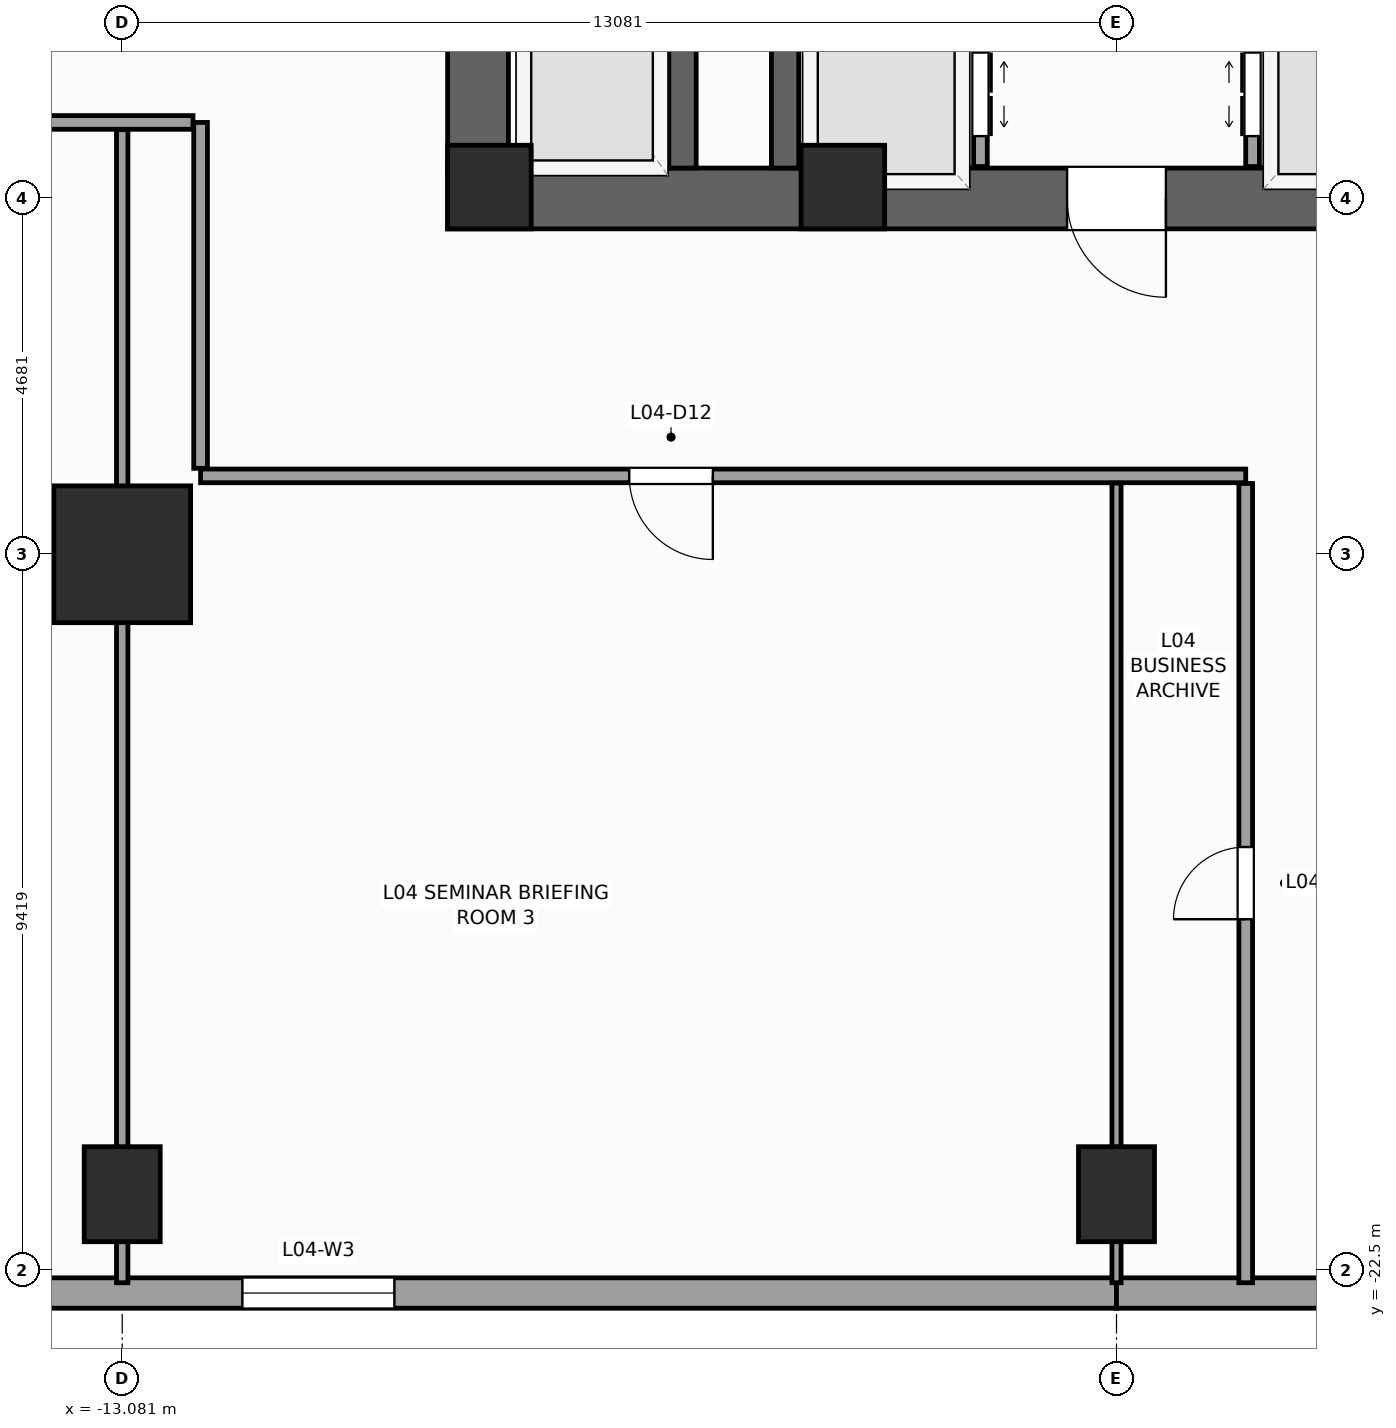
"""IFC4 building model, lengths in metres.
Left out: names, types, materials, properties, quantities, classifications, styles, units other than length and angle.
Written with IfcOpenShell. Run it as: python <this file> out.ifc"""

import sys

from ifc_helpers import new_model, si_unit, direction, frame, frame_2d, origin, origin_2d, place, context, subcontext, project, spatial, rectangle, extrude, source, transform, mapped, element, fill, save


model = new_model("IFC4")
c1 = context("Model", 3, precision=1e-05, world=origin(), true_north=direction((0.0, 1.0)))
c2 = subcontext(c1, "Body", "Model", "MODEL_VIEW")
j1 = project(units=[si_unit("LENGTHUNIT", "METRE"), si_unit("PLANEANGLEUNIT", "RADIAN")], contexts=[c1])
p1 = place(None, origin())
s1 = spatial("IfcSite", under=j1, at=p1, CompositionType="ELEMENT")
p2 = place(p1, origin())
s2 = spatial("IfcBuilding", under=s1, at=p2, CompositionType="ELEMENT")
p3 = place(p2, frame((0.0, 0.0, 21.0)))
s3 = spatial("IfcBuildingStorey", under=s2, at=p3, CompositionType="ELEMENT", Elevation=21.0)
p4 = place(p3, frame((-8.8, -8.4, 0.0), z_axis=(0.0, 0.0, 1.0), x_axis=(1.0, 0.0, 0.0)))
e1 = element("IfcWall", 1, at=p4, inside=s3, PredefinedType="SHEAR", context=c2, shape_type="SweptSolid", body=[
    extrude(rectangle(XDim=17.6, YDim=0.8, at=frame_2d((8.8, 0.0))), origin(), (0.0, 0.0, 1.0), 5.0),
])
p5 = place(p4, frame((8.15, 0.0, 0.0)))
e2 = element("IfcOpeningElement", 2, at=p5, cuts=e1, PredefinedType="OPENING", context=c2, shape_type="SweptSolid", body=[
    extrude(rectangle(XDim=1.3, YDim=2.2, at=frame_2d((0.65, 1.1))), frame((0.0, 0.41, 0.0), z_axis=(0.0, -1.0, 0.0), x_axis=(1.0, 0.0, 0.0)), (0.0, 0.0, 1.0), 0.82),
])
p6 = place(p3, frame((-8.4, -8.0, 0.0), z_axis=(0.0, 0.0, 1.0), x_axis=(0.0, 1.0, 0.0)))
e3 = element("IfcWall", 3, at=p6, inside=s3, PredefinedType="SHEAR", context=c2, shape_type="SweptSolid", body=[
    extrude(rectangle(XDim=16.0, YDim=0.8, at=frame_2d((8.0, 0.0))), origin(), (0.0, 0.0, 1.0), 5.0),
])
p7 = place(p6, frame((4.69, 0.0, 0.0)))
e4 = element("IfcOpeningElement", 4, at=p7, cuts=e3, PredefinedType="OPENING", context=c2, shape_type="SweptSolid", body=[
    extrude(rectangle(XDim=1.3, YDim=2.2, at=frame_2d((0.65, 1.1))), frame((0.0, 0.41, 0.0), z_axis=(0.0, -1.0, 0.0), x_axis=(1.0, 0.0, 0.0)), (0.0, 0.0, 1.0), 0.82),
])
p8 = place(p3, frame((-4.36, -8.0, 0.0), z_axis=(0.0, 0.0, 1.0), x_axis=(0.0, 1.0, 0.0)))
e5 = element("IfcWall", 5, at=p8, inside=s3, PredefinedType="SHEAR", context=c2, shape_type="SweptSolid", body=[
    extrude(rectangle(XDim=16.0, YDim=0.36, at=frame_2d((8.0, 0.0))), origin(), (0.0, 0.0, 1.0), 5.0),
])
p9 = place(p3, frame((-5.71, -8.0, 0.0), z_axis=(0.0, 0.0, 1.0), x_axis=(0.0, 1.0, 0.0)))
e6 = element("IfcWall", 6, at=p9, inside=s3, PredefinedType="SHEAR", context=c2, shape_type="SweptSolid", body=[
    extrude(rectangle(XDim=2.54, YDim=0.36, at=frame_2d((1.27, 0.0))), origin(), (0.0, 0.0, 1.0), 5.0),
])
m1 = source(origin(), c2, "Body", "SweptSolid", [
    extrude(rectangle(XDim=1.1, YDim=1.1, at=origin_2d()), origin(), (0.0, 0.0, 1.0), 5.0),
])
for number, where, z_axis, x_axis in (
    (7, (-8.25, -8.25, 0.0), (0.0, 0.0, 1.0), (1.0, 0.0, 0.0)),
    (8, (-3.6, -8.25, 0.0), (0.0, 0.0, 1.0), (1.0, 0.0, 0.0)),
):
    element("IfcColumn", number, at=place(p3, frame(where, z_axis=z_axis, x_axis=x_axis)), inside=s3, PredefinedType="PILASTER", context=c2, shape_type="MappedRepresentation", body=[
        mapped(m1, transform((0.0, 0.0, 0.0), scale=1.0)),
    ])
m2 = source(origin(), c2, "Body", "SweptSolid", [
    extrude(rectangle(XDim=1.8, YDim=1.8, at=origin_2d()), origin(), (0.0, 0.0, 1.0), 5.0),
])
p10 = place(p3, frame((-13.081, -13.081, 0.0), z_axis=(0.0, 0.0, 1.0), x_axis=(1.0, 0.0, 0.0)))
e9 = element("IfcColumn", 9, at=p10, inside=s3, PredefinedType="COLUMN", context=c2, shape_type="MappedRepresentation", body=[
    mapped(m2, transform((0.0, 0.0, 0.0), scale=1.0)),
])
m3 = source(origin(), c2, "Body", "SweptSolid", [
    extrude(rectangle(XDim=1.0, YDim=1.25, at=origin_2d()), origin(), (0.0, 0.0, 1.0), 5.0),
])
for number, where, z_axis, x_axis in (
    (10, (-13.081, -21.5, 0.0), (0.0, 0.0, 1.0), (1.0, 0.0, 0.0)),
    (11, (0.0, -21.5, 0.0), (0.0, 0.0, 1.0), (1.0, 0.0, 0.0)),
):
    element("IfcColumn", number, at=place(p3, frame(where, z_axis=z_axis, x_axis=x_axis)), inside=s3, PredefinedType="COLUMN", context=c2, shape_type="MappedRepresentation", body=[
        mapped(m3, transform((0.0, 0.0, 0.0), scale=1.0)),
    ])
p11 = place(p3, frame((-31.0, -22.8, 0.0), z_axis=(0.0, 0.0, 1.0), x_axis=(1.0, 0.0, 0.0)))
e12 = element("IfcWall", 12, at=p11, inside=s3, PredefinedType="STANDARD", context=c2, shape_type="SweptSolid", body=[
    extrude(rectangle(XDim=31.0, YDim=0.4, at=frame_2d((15.5, 0.0))), origin(), (0.0, 0.0, 1.0), 4.72),
])
p12 = place(p11, frame((9.0, 0.0, 0.65)))
e13 = element("IfcOpeningElement", 13, at=p12, cuts=e12, PredefinedType="OPENING", context=c2, shape_type="SweptSolid", body=[
    extrude(rectangle(XDim=2.0, YDim=1.45, at=frame_2d((1.0, 0.725))), frame((0.0, 0.21, 0.0), z_axis=(0.0, -1.0, 0.0), x_axis=(1.0, 0.0, 0.0)), (0.0, 0.0, 1.0), 0.42),
])
p13 = place(p11, frame((14.0, 0.0, 0.65)))
e14 = element("IfcOpeningElement", 14, at=p13, cuts=e12, PredefinedType="OPENING", context=c2, shape_type="SweptSolid", body=[
    extrude(rectangle(XDim=2.0, YDim=1.45, at=frame_2d((1.0, 0.725))), frame((0.0, 0.21, 0.0), z_axis=(0.0, -1.0, 0.0), x_axis=(1.0, 0.0, 0.0)), (0.0, 0.0, 1.0), 0.42),
])
p14 = place(p11, frame((19.5, 0.0, 0.65)))
e15 = element("IfcOpeningElement", 15, at=p14, cuts=e12, PredefinedType="OPENING", context=c2, shape_type="SweptSolid", body=[
    extrude(rectangle(XDim=2.0, YDim=1.45, at=frame_2d((1.0, 0.725))), frame((0.0, 0.21, 0.0), z_axis=(0.0, -1.0, 0.0), x_axis=(1.0, 0.0, 0.0)), (0.0, 0.0, 1.0), 0.42),
])
p15 = place(p3, frame((0.0, -22.8, 0.0), z_axis=(0.0, 0.0, 1.0), x_axis=(1.0, 0.0, 0.0)))
e16 = element("IfcWall", 16, at=p15, inside=s3, PredefinedType="STANDARD", context=c2, shape_type="SweptSolid", body=[
    extrude(rectangle(XDim=31.0, YDim=0.4, at=frame_2d((15.5, 0.0))), origin(), (0.0, 0.0, 1.0), 4.72),
])
p16 = place(p15, frame((9.5, 0.0, 0.65)))
e17 = element("IfcOpeningElement", 17, at=p16, cuts=e16, PredefinedType="OPENING", context=c2, shape_type="SweptSolid", body=[
    extrude(rectangle(XDim=2.0, YDim=1.45, at=frame_2d((1.0, 0.725))), frame((0.0, 0.21, 0.0), z_axis=(0.0, -1.0, 0.0), x_axis=(1.0, 0.0, 0.0)), (0.0, 0.0, 1.0), 0.42),
])
p17 = place(p15, frame((15.0, 0.0, 0.65)))
e18 = element("IfcOpeningElement", 18, at=p17, cuts=e16, PredefinedType="OPENING", context=c2, shape_type="SweptSolid", body=[
    extrude(rectangle(XDim=2.0, YDim=1.45, at=frame_2d((1.0, 0.725))), frame((0.0, 0.21, 0.0), z_axis=(0.0, -1.0, 0.0), x_axis=(1.0, 0.0, 0.0)), (0.0, 0.0, 1.0), 0.42),
])
p18 = place(p15, frame((20.0, 0.0, 0.65)))
e19 = element("IfcOpeningElement", 19, at=p18, cuts=e16, PredefinedType="OPENING", context=c2, shape_type="SweptSolid", body=[
    extrude(rectangle(XDim=2.0, YDim=1.45, at=frame_2d((1.0, 0.725))), frame((0.0, 0.21, 0.0), z_axis=(0.0, -1.0, 0.0), x_axis=(1.0, 0.0, 0.0)), (0.0, 0.0, 1.0), 0.42),
])
p19 = place(p3, frame((-1.79, -7.98, 0.0), z_axis=(0.0, 0.0, 1.0), x_axis=(0.0, 1.0, 0.0)))
e20 = element("IfcWall", 20, at=p19, inside=s3, PredefinedType="PARTITIONING", context=c2, shape_type="SweptSolid", body=[
    extrude(rectangle(XDim=12.38, YDim=0.18, at=frame_2d((6.19, 0.0))), origin(), (0.0, 0.0, 1.0), 4.72),
])
p20 = place(p19, frame((0.4, 0.0, 0.0)))
e21 = element("IfcOpeningElement", 21, at=p20, cuts=e20, PredefinedType="OPENING", context=c2, shape_type="SweptSolid", body=[
    extrude(rectangle(XDim=1.1, YDim=2.2, at=frame_2d((0.55, 1.1))), frame((0.0, 0.1, 0.0), z_axis=(0.0, -1.0, 0.0), x_axis=(1.0, 0.0, 0.0)), (0.0, 0.0, 1.0), 0.2),
])
p21 = place(p19, frame((2.46, 0.0, 0.0)))
e22 = element("IfcOpeningElement", 22, at=p21, cuts=e20, PredefinedType="OPENING", context=c2, shape_type="SweptSolid", body=[
    extrude(rectangle(XDim=1.1, YDim=2.2, at=frame_2d((0.55, 1.1))), frame((0.0, 0.1, 0.0), z_axis=(0.0, -1.0, 0.0), x_axis=(1.0, 0.0, 0.0)), (0.0, 0.0, 1.0), 0.2),
])
p22 = place(p3, frame((1.79, -7.98, 0.0), z_axis=(0.0, 0.0, 1.0), x_axis=(0.0, 1.0, 0.0)))
e23 = element("IfcWall", 23, at=p22, inside=s3, PredefinedType="PARTITIONING", context=c2, shape_type="SweptSolid", body=[
    extrude(rectangle(XDim=12.38, YDim=0.18, at=frame_2d((6.19, 0.0))), origin(), (0.0, 0.0, 1.0), 4.72),
])
p23 = place(p22, frame((0.4, 0.0, 0.0)))
e24 = element("IfcOpeningElement", 24, at=p23, cuts=e23, PredefinedType="OPENING", context=c2, shape_type="SweptSolid", body=[
    extrude(rectangle(XDim=1.1, YDim=2.2, at=frame_2d((0.55, 1.1))), frame((0.0, 0.1, 0.0), z_axis=(0.0, -1.0, 0.0), x_axis=(1.0, 0.0, 0.0)), (0.0, 0.0, 1.0), 0.2),
])
p24 = place(p22, frame((2.46, 0.0, 0.0)))
e25 = element("IfcOpeningElement", 25, at=p24, cuts=e23, PredefinedType="OPENING", context=c2, shape_type="SweptSolid", body=[
    extrude(rectangle(XDim=1.1, YDim=2.2, at=frame_2d((0.55, 1.1))), frame((0.0, 0.1, 0.0), z_axis=(0.0, -1.0, 0.0), x_axis=(1.0, 0.0, 0.0)), (0.0, 0.0, 1.0), 0.2),
])
p25 = place(p3, frame((-12.05, -12.05, 0.0), z_axis=(0.0, 0.0, 1.0), x_axis=(1.0, 0.0, 0.0)))
e26 = element("IfcWall", 26, at=p25, inside=s3, PredefinedType="PARTITIONING", context=c2, shape_type="SweptSolid", body=[
    extrude(rectangle(XDim=13.75, YDim=0.18, at=frame_2d((6.875, 0.0))), origin(), (0.0, 0.0, 1.0), 4.72),
])
p26 = place(p25, frame((5.639, 0.0, 0.0)))
e27 = element("IfcOpeningElement", 27, at=p26, cuts=e26, PredefinedType="OPENING", context=c2, shape_type="SweptSolid", body=[
    extrude(rectangle(XDim=1.1, YDim=2.2, at=frame_2d((0.55, 1.1))), frame((0.0, 0.1, 0.0), z_axis=(0.0, -1.0, 0.0), x_axis=(1.0, 0.0, 0.0)), (0.0, 0.0, 1.0), 0.2),
])
p27 = place(p3, frame((-12.05, -11.95, 0.0), z_axis=(0.0, 0.0, 1.0), x_axis=(0.0, 1.0, 0.0)))
e28 = element("IfcWall", 28, at=p27, inside=s3, PredefinedType="PARTITIONING", context=c2, shape_type="SweptSolid", body=[
    extrude(rectangle(XDim=4.55, YDim=0.18, at=frame_2d((2.275, 0.0))), origin(), (0.0, 0.0, 1.0), 4.72),
])
p28 = place(p3, frame((-30.665, -7.4, 0.0), z_axis=(0.0, 0.0, 1.0), x_axis=(1.0, 0.0, 0.0)))
e29 = element("IfcWall", 29, at=p28, inside=s3, PredefinedType="PARTITIONING", context=c2, shape_type="SweptSolid", body=[
    extrude(rectangle(XDim=18.515, YDim=0.18, at=frame_2d((9.258, 0.0))), origin(), (0.0, 0.0, 1.0), 4.72),
])
p29 = place(p28, frame((1.455, 0.0, 0.0)))
e30 = element("IfcOpeningElement", 30, at=p29, cuts=e29, PredefinedType="OPENING", context=c2, shape_type="SweptSolid", body=[
    extrude(rectangle(XDim=0.95, YDim=2.1, at=frame_2d((0.475, 1.05))), frame((0.0, 0.1, 0.0), z_axis=(0.0, -1.0, 0.0), x_axis=(1.0, 0.0, 0.0)), (0.0, 0.0, 1.0), 0.2),
])
p30 = place(p28, frame((9.701, 0.0, 0.0)))
e31 = element("IfcOpeningElement", 31, at=p30, cuts=e29, PredefinedType="OPENING", context=c2, shape_type="SweptSolid", body=[
    extrude(rectangle(XDim=1.1, YDim=2.2, at=frame_2d((0.55, 1.1))), frame((0.0, 0.1, 0.0), z_axis=(0.0, -1.0, 0.0), x_axis=(1.0, 0.0, 0.0)), (0.0, 0.0, 1.0), 0.2),
])
p31 = place(p3, frame((1.7, -22.665, 0.0), z_axis=(0.0, 0.0, 1.0), x_axis=(0.0, 1.0, 0.0)))
e32 = element("IfcWall", 32, at=p31, inside=s3, PredefinedType="PARTITIONING", context=c2, shape_type="SweptSolid", body=[
    extrude(rectangle(XDim=10.515, YDim=0.18, at=frame_2d((5.258, 0.0))), origin(), (0.0, 0.0, 1.0), 4.72),
])
p32 = place(p31, frame((4.782, 0.0, 0.0)))
e33 = element("IfcOpeningElement", 33, at=p32, cuts=e32, PredefinedType="OPENING", context=c2, shape_type="SweptSolid", body=[
    extrude(rectangle(XDim=0.95, YDim=2.15, at=frame_2d((0.475, 1.075))), frame((0.0, 0.1, 0.0), z_axis=(0.0, -1.0, 0.0), x_axis=(1.0, 0.0, 0.0)), (0.0, 0.0, 1.0), 0.2),
])
p33 = place(p3, frame((-13.081, -22.665, 0.0), z_axis=(0.0, 0.0, 1.0), x_axis=(0.0, 1.0, 0.0)))
e34 = element("IfcWall", 34, at=p33, inside=s3, PredefinedType="PARTITIONING", context=c2, shape_type="SweptSolid", body=[
    extrude(rectangle(XDim=15.17, YDim=0.15, at=frame_2d((7.585, 0.0))), origin(), (0.0, 0.0, 1.0), 2.88),
])
p34 = place(p3, frame((0.0, -22.665, 0.0), z_axis=(0.0, 0.0, 1.0), x_axis=(0.0, 1.0, 0.0)))
e35 = element("IfcWall", 35, at=p34, inside=s3, PredefinedType="PARTITIONING", context=c2, shape_type="SweptSolid", body=[
    extrude(rectangle(XDim=10.52, YDim=0.12, at=frame_2d((5.26, 0.0))), origin(), (0.0, 0.0, 1.0), 2.75),
])
m4 = source(origin(), c2, "Body", "SweptSolid", [
    extrude(rectangle(XDim=2.0, YDim=1.45, at=frame_2d((1.0, 0.725))), frame((0.0, 0.03, 0.0), z_axis=(0.0, -1.0, 0.0), x_axis=(1.0, 0.0, 0.0)), (0.0, 0.0, 1.0), 0.06),
])
p35 = place(p14, origin())
e36 = element("IfcWindow", 36, at=p35, inside=s3, PartitioningType="SINGLE_PANEL", PredefinedType="WINDOW", context=c2, shape_type="MappedRepresentation", body=[
    mapped(m4, transform((0.0, 0.0, 0.0), scale=1.0)),
])
fill(e15, e36)
m5 = source(origin(), c2, "Body", "SweptSolid", [
    extrude(rectangle(XDim=1.3, YDim=2.2, at=frame_2d((0.65, 1.1))), frame((0.0, 0.025, 0.0), z_axis=(0.0, -1.0, 0.0), x_axis=(1.0, 0.0, 0.0)), (0.0, 0.0, 1.0), 0.05),
])
p36 = place(p5, frame((1.3, 0.0, 0.0), z_axis=(0.0, 0.0, 1.0), x_axis=(-1.0, 0.0, 0.0)))
e37 = element("IfcDoor", 37, at=p36, inside=s3, OperationType="SINGLE_SWING_RIGHT", PredefinedType="DOOR", context=c2, shape_type="MappedRepresentation", body=[
    mapped(m5, transform((0.0, 0.0, 0.0), scale=1.0)),
])
fill(e2, e37)
m6 = source(origin(), c2, "Body", "SweptSolid", [
    extrude(rectangle(XDim=1.1, YDim=2.2, at=frame_2d((0.55, 1.1))), frame((0.0, 0.025, 0.0), z_axis=(0.0, -1.0, 0.0), x_axis=(1.0, 0.0, 0.0)), (0.0, 0.0, 1.0), 0.05),
])
p37 = place(p20, frame((1.1, 0.0, 0.0), z_axis=(0.0, 0.0, 1.0), x_axis=(-1.0, 0.0, 0.0)))
e38 = element("IfcDoor", 38, at=p37, inside=s3, OperationType="DOUBLE_DOOR_SLIDING", PredefinedType="DOOR", context=c2, shape_type="MappedRepresentation", body=[
    mapped(m6, transform((0.0, 0.0, 0.0), scale=1.0)),
])
fill(e21, e38)
p38 = place(p23, origin())
e39 = element("IfcDoor", 39, at=p38, inside=s3, OperationType="DOUBLE_DOOR_SLIDING", PredefinedType="DOOR", context=c2, shape_type="MappedRepresentation", body=[
    mapped(m6, transform((0.0, 0.0, 0.0), scale=1.0)),
])
fill(e24, e39)
p39 = place(p26, frame((1.1, 0.0, 0.0), z_axis=(0.0, 0.0, 1.0), x_axis=(-1.0, 0.0, 0.0)))
e40 = element("IfcDoor", 40, at=p39, inside=s3, OperationType="SINGLE_SWING_RIGHT", PredefinedType="DOOR", context=c2, shape_type="MappedRepresentation", body=[
    mapped(m6, transform((0.0, 0.0, 0.0), scale=1.0)),
])
fill(e27, e40)
m7 = source(origin(), c2, "Body", "SweptSolid", [
    extrude(rectangle(XDim=0.95, YDim=2.15, at=frame_2d((0.475, 1.075))), frame((0.0, 0.025, 0.0), z_axis=(0.0, -1.0, 0.0), x_axis=(1.0, 0.0, 0.0)), (0.0, 0.0, 1.0), 0.05),
])
p40 = place(p32, origin())
e41 = element("IfcDoor", 41, at=p40, inside=s3, OperationType="SINGLE_SWING_LEFT", PredefinedType="DOOR", context=c2, shape_type="MappedRepresentation", body=[
    mapped(m7, transform((0.0, 0.0, 0.0), scale=1.0)),
])
fill(e33, e41)
save(model, sys.argv[1])
